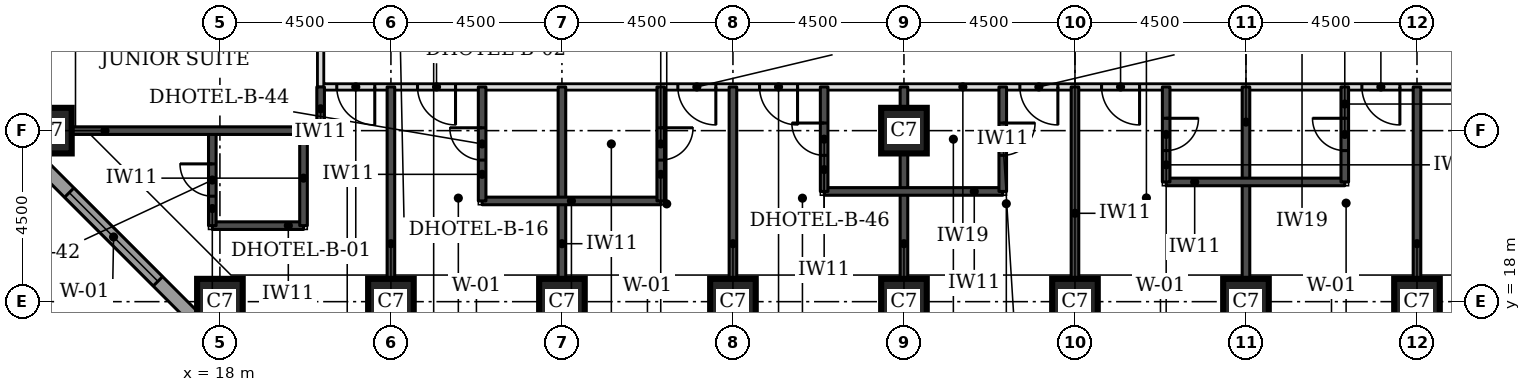
"""IFC4 building model, lengths in metres.
Left out: names, types, materials, properties, quantities, classifications, styles, units other than length and angle.
Written with IfcOpenShell. Run it as: python <this file> out.ifc"""

import sys

from ifc_helpers import new_model, si_unit, direction, frame, frame_2d, origin, origin_2d, place, context, subcontext, project, spatial, rectangle, extrude, element, fill, save


model = new_model("IFC4")
c1 = context("Model", 3, precision=1e-05, world=origin(), true_north=direction((0.0, 1.0)))
c2 = subcontext(c1, "Body", "Model", "MODEL_VIEW")
j1 = project(units=[si_unit("LENGTHUNIT", "METRE"), si_unit("PLANEANGLEUNIT", "RADIAN")], contexts=[c1])
p1 = place(None, origin())
s1 = spatial("IfcSite", under=j1, at=p1, CompositionType="ELEMENT")
p2 = place(p1, origin())
s2 = spatial("IfcBuilding", under=s1, at=p2, CompositionType="ELEMENT")
p3 = place(p2, frame((0.0, 0.0, 52.8)))
s3 = spatial("IfcBuildingStorey", under=s2, at=p3, CompositionType="ELEMENT", Elevation=52.8)
for number, where, z_axis, x_axis in (
    (1, (18.0, 18.0, 0.0), (0.0, 0.0, 1.0), (1.0, 0.0, 0.0)),
    (2, (22.5, 18.0, 0.0), (0.0, 0.0, 1.0), (1.0, 0.0, 0.0)),
    (3, (27.0, 18.0, 0.0), (0.0, 0.0, 1.0), (1.0, 0.0, 0.0)),
    (4, (31.5, 18.0, 0.0), (0.0, 0.0, 1.0), (1.0, 0.0, 0.0)),
    (5, (36.0, 18.0, 0.0), (0.0, 0.0, 1.0), (1.0, 0.0, 0.0)),
    (6, (40.5, 18.0, 0.0), (0.0, 0.0, 1.0), (1.0, 0.0, 0.0)),
    (7, (45.0, 18.0, 0.0), (0.0, 0.0, 1.0), (1.0, 0.0, 0.0)),
    (8, (49.5, 18.0, 0.0), (0.0, 0.0, 1.0), (1.0, 0.0, 0.0)),
    (9, (13.5, 22.5, 0.0), (0.0, 0.0, 1.0), (1.0, 0.0, 0.0)),
    (10, (36.0, 22.5, 0.0), (0.0, 0.0, 1.0), (1.0, 0.0, 0.0)),
):
    element("IfcColumn", number, at=place(p3, frame(where, z_axis=z_axis, x_axis=x_axis)), inside=s3, PredefinedType="COLUMN", context=c2, shape_type="SweptSolid", body=[
        extrude(rectangle(XDim=1.2, YDim=1.2, at=origin_2d()), origin(), (0.0, 0.0, 1.0), 3.3),
    ])
p4 = place(p3, frame((12.674, 22.23, 0.0), z_axis=(0.0, 0.0, 1.0), x_axis=(0.707106781187, -0.707106781187, 0.0)))
e11 = element("IfcWall", 11, at=p4, inside=s3, PredefinedType="STANDARD", context=c2, shape_type="SweptSolid", body=[
    extrude(rectangle(XDim=7.151, YDim=0.35, at=frame_2d((3.576, 0.0))), origin(), (0.0, 0.0, 1.0), 3.055),
])
p5 = place(p4, frame((1.926, 0.0, 0.8)))
e12 = element("IfcOpeningElement", 12, at=p5, cuts=e11, PredefinedType="OPENING", context=c2, shape_type="SweptSolid", body=[
    extrude(rectangle(XDim=3.3, YDim=1.5, at=frame_2d((1.65, 0.75))), frame((0.0, 0.185, 0.0), z_axis=(0.0, -1.0, 0.0), x_axis=(1.0, 0.0, 0.0)), (0.0, 0.0, 1.0), 0.37),
])
p6 = place(p3, frame((20.65, 23.65, 0.0), z_axis=(0.0, 0.0, 1.0), x_axis=(1.0, 0.0, 0.0)))
e13 = element("IfcWall", 13, at=p6, inside=s3, PredefinedType="PARTITIONING", context=c2, shape_type="SweptSolid", body=[
    extrude(rectangle(XDim=32.2, YDim=0.15, at=frame_2d((16.1, 0.0))), origin(), (0.0, 0.0, 1.0), 3.08),
])
p7 = place(p6, frame((2.55, 0.0, 0.0)))
e14 = element("IfcOpeningElement", 14, at=p7, cuts=e13, PredefinedType="OPENING", context=c2, shape_type="SweptSolid", body=[
    extrude(rectangle(XDim=1.0, YDim=2.1, at=frame_2d((0.5, 1.05))), frame((0.0, 0.085, 0.0), z_axis=(0.0, -1.0, 0.0), x_axis=(1.0, 0.0, 0.0)), (0.0, 0.0, 1.0), 0.17),
])
p8 = place(p6, frame((9.4, 0.0, 0.0)))
e15 = element("IfcOpeningElement", 15, at=p8, cuts=e13, PredefinedType="OPENING", context=c2, shape_type="SweptSolid", body=[
    extrude(rectangle(XDim=1.0, YDim=2.1, at=frame_2d((0.5, 1.05))), frame((0.0, 0.085, 0.0), z_axis=(0.0, -1.0, 0.0), x_axis=(1.0, 0.0, 0.0)), (0.0, 0.0, 1.0), 0.17),
])
p9 = place(p6, frame((11.55, 0.0, 0.0)))
e16 = element("IfcOpeningElement", 16, at=p9, cuts=e13, PredefinedType="OPENING", context=c2, shape_type="SweptSolid", body=[
    extrude(rectangle(XDim=1.0, YDim=2.1, at=frame_2d((0.5, 1.05))), frame((0.0, 0.085, 0.0), z_axis=(0.0, -1.0, 0.0), x_axis=(1.0, 0.0, 0.0)), (0.0, 0.0, 1.0), 0.17),
])
p10 = place(p6, frame((18.4, 0.0, 0.0)))
e17 = element("IfcOpeningElement", 17, at=p10, cuts=e13, PredefinedType="OPENING", context=c2, shape_type="SweptSolid", body=[
    extrude(rectangle(XDim=1.0, YDim=2.1, at=frame_2d((0.5, 1.05))), frame((0.0, 0.085, 0.0), z_axis=(0.0, -1.0, 0.0), x_axis=(1.0, 0.0, 0.0)), (0.0, 0.0, 1.0), 0.17),
])
p11 = place(p6, frame((20.55, 0.0, 0.0)))
e18 = element("IfcOpeningElement", 18, at=p11, cuts=e13, PredefinedType="OPENING", context=c2, shape_type="SweptSolid", body=[
    extrude(rectangle(XDim=1.0, YDim=2.1, at=frame_2d((0.5, 1.05))), frame((0.0, 0.085, 0.0), z_axis=(0.0, -1.0, 0.0), x_axis=(1.0, 0.0, 0.0)), (0.0, 0.0, 1.0), 0.17),
])
p12 = place(p6, frame((27.4, 0.0, 0.0)))
e19 = element("IfcOpeningElement", 19, at=p12, cuts=e13, PredefinedType="OPENING", context=c2, shape_type="SweptSolid", body=[
    extrude(rectangle(XDim=1.0, YDim=2.1, at=frame_2d((0.5, 1.05))), frame((0.0, 0.085, 0.0), z_axis=(0.0, -1.0, 0.0), x_axis=(1.0, 0.0, 0.0)), (0.0, 0.0, 1.0), 0.17),
])
p13 = place(p6, frame((0.425, 0.0, 0.0)))
e20 = element("IfcOpeningElement", 20, at=p13, cuts=e13, PredefinedType="OPENING", context=c2, shape_type="SweptSolid", body=[
    extrude(rectangle(XDim=1.0, YDim=2.1, at=frame_2d((0.5, 1.05))), frame((0.0, 0.085, 0.0), z_axis=(0.0, -1.0, 0.0), x_axis=(1.0, 0.0, 0.0)), (0.0, 0.0, 1.0), 0.17),
])
p14 = place(p6, frame((30.025, 0.0, 0.0)))
e21 = element("IfcOpeningElement", 21, at=p14, cuts=e13, PredefinedType="OPENING", context=c2, shape_type="SweptSolid", body=[
    extrude(rectangle(XDim=1.0, YDim=2.1, at=frame_2d((0.5, 1.05))), frame((0.0, 0.085, 0.0), z_axis=(0.0, -1.0, 0.0), x_axis=(1.0, 0.0, 0.0)), (0.0, 0.0, 1.0), 0.17),
])
p15 = place(p3, frame((20.65, 23.65, 0.0), z_axis=(0.0, 0.0, 1.0), x_axis=(0.0, 1.0, 0.0)))
e22 = element("IfcWall", 22, at=p15, inside=s3, PredefinedType="PARTITIONING", context=c2, shape_type="SweptSolid", body=[
    extrude(rectangle(XDim=25.85, YDim=0.15, at=frame_2d((12.925, 0.0))), origin(), (0.0, 0.0, 1.0), 3.08),
])
p16 = place(p15, frame((1.5, 0.0, 0.0)))
e23 = element("IfcOpeningElement", 23, at=p16, cuts=e22, PredefinedType="OPENING", context=c2, shape_type="SweptSolid", body=[
    extrude(rectangle(XDim=1.0, YDim=2.1, at=frame_2d((0.5, 1.05))), frame((0.0, 0.085, 0.0), z_axis=(0.0, -1.0, 0.0), x_axis=(1.0, 0.0, 0.0)), (0.0, 0.0, 1.0), 0.17),
])
p17 = place(p15, frame((13.45, 0.0, 0.0)))
e24 = element("IfcOpeningElement", 24, at=p17, cuts=e22, PredefinedType="OPENING", context=c2, shape_type="SweptSolid", body=[
    extrude(rectangle(XDim=1.0, YDim=2.1, at=frame_2d((0.5, 1.05))), frame((0.0, 0.085, 0.0), z_axis=(0.0, -1.0, 0.0), x_axis=(1.0, 0.0, 0.0)), (0.0, 0.0, 1.0), 0.17),
])
p18 = place(p15, frame((19.5, 0.0, 0.0)))
e25 = element("IfcOpeningElement", 25, at=p18, cuts=e22, PredefinedType="OPENING", context=c2, shape_type="SweptSolid", body=[
    extrude(rectangle(XDim=1.0, YDim=2.1, at=frame_2d((0.5, 1.05))), frame((0.0, 0.085, 0.0), z_axis=(0.0, -1.0, 0.0), x_axis=(1.0, 0.0, 0.0)), (0.0, 0.0, 1.0), 0.17),
])
for number, where, z_axis, x_axis in (
    (26, (22.5, 18.6, 0.0), (0.0, 0.0, 1.0), (0.0, 1.0, 0.0)),
    (27, (27.0, 18.6, 0.0), (0.0, 0.0, 1.0), (0.0, 1.0, 0.0)),
    (28, (31.5, 18.6, 0.0), (0.0, 0.0, 1.0), (0.0, 1.0, 0.0)),
    (29, (36.0, 18.6, 0.0), (0.0, 0.0, 1.0), (0.0, 1.0, 0.0)),
    (30, (40.5, 18.6, 0.0), (0.0, 0.0, 1.0), (0.0, 1.0, 0.0)),
    (31, (45.0, 18.6, 0.0), (0.0, 0.0, 1.0), (0.0, 1.0, 0.0)),
    (32, (49.5, 18.6, 0.0), (0.0, 0.0, 1.0), (0.0, 1.0, 0.0)),
):
    element("IfcWall", number, at=place(p3, frame(where, z_axis=z_axis, x_axis=x_axis)), inside=s3, PredefinedType="SOLIDWALL", context=c2, shape_type="SweptSolid", body=[
        extrude(rectangle(XDim=5.05, YDim=0.2, at=frame_2d((2.525, 0.0))), origin(), (0.0, 0.0, 1.0), 3.08),
    ])
p19 = place(p3, frame((17.8, 20.0, 0.0), z_axis=(0.0, 0.0, 1.0), x_axis=(1.0, 0.0, 0.0)))
e33 = element("IfcWall", 33, at=p19, inside=s3, PredefinedType="SOLIDWALL", context=c2, shape_type="SweptSolid", body=[
    extrude(rectangle(XDim=2.4, YDim=0.2, at=frame_2d((1.2, 0.0))), origin(), (0.0, 0.0, 1.0), 3.08),
])
p20 = place(p3, frame((17.8, 20.0, 0.0), z_axis=(0.0, 0.0, 1.0), x_axis=(0.0, 1.0, 0.0)))
e34 = element("IfcWall", 34, at=p20, inside=s3, PredefinedType="SOLIDWALL", context=c2, shape_type="SweptSolid", body=[
    extrude(rectangle(XDim=2.5, YDim=0.2, at=frame_2d((1.25, 0.0))), origin(), (0.0, 0.0, 1.0), 3.08),
])
p21 = place(p20, frame((0.775, 0.0, 0.0)))
e35 = element("IfcOpeningElement", 35, at=p21, cuts=e34, PredefinedType="OPENING", context=c2, shape_type="SweptSolid", body=[
    extrude(rectangle(XDim=0.85, YDim=2.1, at=frame_2d((0.425, 1.05))), frame((0.0, 0.11, 0.0), z_axis=(0.0, -1.0, 0.0), x_axis=(1.0, 0.0, 0.0)), (0.0, 0.0, 1.0), 0.22),
])
p22 = place(p3, frame((20.2, 20.0, 0.0), z_axis=(0.0, 0.0, 1.0), x_axis=(0.0, 1.0, 0.0)))
e36 = element("IfcWall", 36, at=p22, inside=s3, PredefinedType="SOLIDWALL", context=c2, shape_type="SweptSolid", body=[
    extrude(rectangle(XDim=2.5, YDim=0.2, at=frame_2d((1.25, 0.0))), origin(), (0.0, 0.0, 1.0), 3.08),
])
p23 = place(p3, frame((24.9, 20.65, 0.0), z_axis=(0.0, 0.0, 1.0), x_axis=(1.0, 0.0, 0.0)))
e37 = element("IfcWall", 37, at=p23, inside=s3, PredefinedType="SOLIDWALL", context=c2, shape_type="SweptSolid", body=[
    extrude(rectangle(XDim=4.7, YDim=0.2, at=frame_2d((2.35, 0.0))), origin(), (0.0, 0.0, 1.0), 3.08),
])
p24 = place(p3, frame((24.9, 20.65, 0.0), z_axis=(0.0, 0.0, 1.0), x_axis=(0.0, 1.0, 0.0)))
e38 = element("IfcWall", 38, at=p24, inside=s3, PredefinedType="SOLIDWALL", context=c2, shape_type="SweptSolid", body=[
    extrude(rectangle(XDim=3.0, YDim=0.2, at=frame_2d((1.5, 0.0))), origin(), (0.0, 0.0, 1.0), 3.08),
])
p25 = place(p24, frame((1.075, 0.0, 0.0)))
e39 = element("IfcOpeningElement", 39, at=p25, cuts=e38, PredefinedType="OPENING", context=c2, shape_type="SweptSolid", body=[
    extrude(rectangle(XDim=0.85, YDim=2.1, at=frame_2d((0.425, 1.05))), frame((0.0, 0.11, 0.0), z_axis=(0.0, -1.0, 0.0), x_axis=(1.0, 0.0, 0.0)), (0.0, 0.0, 1.0), 0.22),
])
p26 = place(p3, frame((29.6, 20.65, 0.0), z_axis=(0.0, 0.0, 1.0), x_axis=(0.0, 1.0, 0.0)))
e40 = element("IfcWall", 40, at=p26, inside=s3, PredefinedType="SOLIDWALL", context=c2, shape_type="SweptSolid", body=[
    extrude(rectangle(XDim=3.0, YDim=0.2, at=frame_2d((1.5, 0.0))), origin(), (0.0, 0.0, 1.0), 3.08),
])
p27 = place(p26, frame((1.075, 0.0, 0.0)))
e41 = element("IfcOpeningElement", 41, at=p27, cuts=e40, PredefinedType="OPENING", context=c2, shape_type="SweptSolid", body=[
    extrude(rectangle(XDim=0.85, YDim=2.1, at=frame_2d((0.425, 1.05))), frame((0.0, 0.11, 0.0), z_axis=(0.0, -1.0, 0.0), x_axis=(1.0, 0.0, 0.0)), (0.0, 0.0, 1.0), 0.22),
])
p28 = place(p3, frame((33.9, 20.9, 0.0), z_axis=(0.0, 0.0, 1.0), x_axis=(1.0, 0.0, 0.0)))
e42 = element("IfcWall", 42, at=p28, inside=s3, PredefinedType="SOLIDWALL", context=c2, shape_type="SweptSolid", body=[
    extrude(rectangle(XDim=4.7, YDim=0.2, at=frame_2d((2.35, 0.0))), origin(), (0.0, 0.0, 1.0), 3.08),
])
p29 = place(p3, frame((33.9, 20.9, 0.0), z_axis=(0.0, 0.0, 1.0), x_axis=(0.0, 1.0, 0.0)))
e43 = element("IfcWall", 43, at=p29, inside=s3, PredefinedType="SOLIDWALL", context=c2, shape_type="SweptSolid", body=[
    extrude(rectangle(XDim=2.75, YDim=0.2, at=frame_2d((1.375, 0.0))), origin(), (0.0, 0.0, 1.0), 3.08),
])
p30 = place(p29, frame((0.95, 0.0, 0.0)))
e44 = element("IfcOpeningElement", 44, at=p30, cuts=e43, PredefinedType="OPENING", context=c2, shape_type="SweptSolid", body=[
    extrude(rectangle(XDim=0.85, YDim=2.1, at=frame_2d((0.425, 1.05))), frame((0.0, 0.11, 0.0), z_axis=(0.0, -1.0, 0.0), x_axis=(1.0, 0.0, 0.0)), (0.0, 0.0, 1.0), 0.22),
])
p31 = place(p3, frame((38.6, 20.9, 0.0), z_axis=(0.0, 0.0, 1.0), x_axis=(0.0, 1.0, 0.0)))
e45 = element("IfcWall", 45, at=p31, inside=s3, PredefinedType="SOLIDWALL", context=c2, shape_type="SweptSolid", body=[
    extrude(rectangle(XDim=2.75, YDim=0.2, at=frame_2d((1.375, 0.0))), origin(), (0.0, 0.0, 1.0), 3.08),
])
p32 = place(p31, frame((0.95, 0.0, 0.0)))
e46 = element("IfcOpeningElement", 46, at=p32, cuts=e45, PredefinedType="OPENING", context=c2, shape_type="SweptSolid", body=[
    extrude(rectangle(XDim=0.85, YDim=2.1, at=frame_2d((0.425, 1.05))), frame((0.0, 0.11, 0.0), z_axis=(0.0, -1.0, 0.0), x_axis=(1.0, 0.0, 0.0)), (0.0, 0.0, 1.0), 0.22),
])
p33 = place(p3, frame((42.9, 21.15, 0.0), z_axis=(0.0, 0.0, 1.0), x_axis=(1.0, 0.0, 0.0)))
e47 = element("IfcWall", 47, at=p33, inside=s3, PredefinedType="SOLIDWALL", context=c2, shape_type="SweptSolid", body=[
    extrude(rectangle(XDim=4.7, YDim=0.2, at=frame_2d((2.35, 0.0))), origin(), (0.0, 0.0, 1.0), 3.08),
])
p34 = place(p3, frame((42.9, 21.15, 0.0), z_axis=(0.0, 0.0, 1.0), x_axis=(0.0, 1.0, 0.0)))
e48 = element("IfcWall", 48, at=p34, inside=s3, PredefinedType="SOLIDWALL", context=c2, shape_type="SweptSolid", body=[
    extrude(rectangle(XDim=2.5, YDim=0.2, at=frame_2d((1.25, 0.0))), origin(), (0.0, 0.0, 1.0), 3.08),
])
p35 = place(p34, frame((0.825, 0.0, 0.0)))
e49 = element("IfcOpeningElement", 49, at=p35, cuts=e48, PredefinedType="OPENING", context=c2, shape_type="SweptSolid", body=[
    extrude(rectangle(XDim=0.85, YDim=2.1, at=frame_2d((0.425, 1.05))), frame((0.0, 0.11, 0.0), z_axis=(0.0, -1.0, 0.0), x_axis=(1.0, 0.0, 0.0)), (0.0, 0.0, 1.0), 0.22),
])
p36 = place(p3, frame((47.6, 21.15, 0.0), z_axis=(0.0, 0.0, 1.0), x_axis=(0.0, 1.0, 0.0)))
e50 = element("IfcWall", 50, at=p36, inside=s3, PredefinedType="SOLIDWALL", context=c2, shape_type="SweptSolid", body=[
    extrude(rectangle(XDim=2.5, YDim=0.2, at=frame_2d((1.25, 0.0))), origin(), (0.0, 0.0, 1.0), 3.08),
])
p37 = place(p36, frame((0.825, 0.0, 0.0)))
e51 = element("IfcOpeningElement", 51, at=p37, cuts=e50, PredefinedType="OPENING", context=c2, shape_type="SweptSolid", body=[
    extrude(rectangle(XDim=0.85, YDim=2.1, at=frame_2d((0.425, 1.05))), frame((0.0, 0.11, 0.0), z_axis=(0.0, -1.0, 0.0), x_axis=(1.0, 0.0, 0.0)), (0.0, 0.0, 1.0), 0.22),
])
p38 = place(p3, frame((14.1, 22.5, 0.0), z_axis=(0.0, 0.0, 1.0), x_axis=(1.0, 0.0, 0.0)))
e52 = element("IfcWall", 52, at=p38, inside=s3, PredefinedType="SOLIDWALL", context=c2, shape_type="SweptSolid", body=[
    extrude(rectangle(XDim=6.55, YDim=0.2, at=frame_2d((3.275, 0.0))), origin(), (0.0, 0.0, 1.0), 3.08),
])
p39 = place(p3, frame((20.65, 22.5, 0.0), z_axis=(0.0, 0.0, 1.0), x_axis=(0.0, 1.0, 0.0)))
e53 = element("IfcWall", 53, at=p39, inside=s3, PredefinedType="SOLIDWALL", context=c2, shape_type="SweptSolid", body=[
    extrude(rectangle(XDim=1.15, YDim=0.2, at=frame_2d((0.575, 0.0))), origin(), (0.0, 0.0, 1.0), 3.08),
])
p40 = place(p5, origin())
e54 = element("IfcWindow", 54, at=p40, inside=s3, PartitioningType="SINGLE_PANEL", PredefinedType="WINDOW", context=c2, shape_type="SweptSolid", body=[
    extrude(rectangle(XDim=3.3, YDim=1.5, at=frame_2d((1.65, 0.75))), frame((0.0, 0.085, 0.0), z_axis=(0.0, -1.0, 0.0), x_axis=(1.0, 0.0, 0.0)), (0.0, 0.0, 1.0), 0.06),
])
fill(e12, e54)
p41 = place(p7, frame((1.0, 0.0, 0.0), z_axis=(0.0, 0.0, 1.0), x_axis=(-1.0, 0.0, 0.0)))
e55 = element("IfcDoor", 55, at=p41, inside=s3, OperationType="SINGLE_SWING_LEFT", PredefinedType="DOOR", context=c2, shape_type="SweptSolid", body=[
    extrude(rectangle(XDim=1.0, YDim=2.1, at=frame_2d((0.5, 1.05))), frame((0.0, 0.025, 0.0), z_axis=(0.0, -1.0, 0.0), x_axis=(1.0, 0.0, 0.0)), (0.0, 0.0, 1.0), 0.05),
])
fill(e14, e55)
p42 = place(p25, origin())
e56 = element("IfcDoor", 56, at=p42, inside=s3, OperationType="SINGLE_SWING_RIGHT", PredefinedType="DOOR", context=c2, shape_type="SweptSolid", body=[
    extrude(rectangle(XDim=0.85, YDim=2.1, at=frame_2d((0.425, 1.05))), frame((0.0, 0.025, 0.0), z_axis=(0.0, -1.0, 0.0), x_axis=(1.0, 0.0, 0.0)), (0.0, 0.0, 1.0), 0.05),
])
fill(e39, e56)
p43 = place(p8, frame((1.0, 0.0, 0.0), z_axis=(0.0, 0.0, 1.0), x_axis=(-1.0, 0.0, 0.0)))
e57 = element("IfcDoor", 57, at=p43, inside=s3, OperationType="SINGLE_SWING_LEFT", PredefinedType="DOOR", context=c2, shape_type="SweptSolid", body=[
    extrude(rectangle(XDim=1.0, YDim=2.1, at=frame_2d((0.5, 1.05))), frame((0.0, 0.025, 0.0), z_axis=(0.0, -1.0, 0.0), x_axis=(1.0, 0.0, 0.0)), (0.0, 0.0, 1.0), 0.05),
])
fill(e15, e57)
p44 = place(p27, frame((0.85, 0.0, 0.0), z_axis=(0.0, 0.0, 1.0), x_axis=(-1.0, 0.0, 0.0)))
e58 = element("IfcDoor", 58, at=p44, inside=s3, OperationType="SINGLE_SWING_LEFT", PredefinedType="DOOR", context=c2, shape_type="SweptSolid", body=[
    extrude(rectangle(XDim=0.85, YDim=2.1, at=frame_2d((0.425, 1.05))), frame((0.0, 0.025, 0.0), z_axis=(0.0, -1.0, 0.0), x_axis=(1.0, 0.0, 0.0)), (0.0, 0.0, 1.0), 0.05),
])
fill(e41, e58)
p45 = place(p9, frame((1.0, 0.0, 0.0), z_axis=(0.0, 0.0, 1.0), x_axis=(-1.0, 0.0, 0.0)))
e59 = element("IfcDoor", 59, at=p45, inside=s3, OperationType="SINGLE_SWING_LEFT", PredefinedType="DOOR", context=c2, shape_type="SweptSolid", body=[
    extrude(rectangle(XDim=1.0, YDim=2.1, at=frame_2d((0.5, 1.05))), frame((0.0, 0.025, 0.0), z_axis=(0.0, -1.0, 0.0), x_axis=(1.0, 0.0, 0.0)), (0.0, 0.0, 1.0), 0.05),
])
fill(e16, e59)
p46 = place(p30, origin())
e60 = element("IfcDoor", 60, at=p46, inside=s3, OperationType="SINGLE_SWING_RIGHT", PredefinedType="DOOR", context=c2, shape_type="SweptSolid", body=[
    extrude(rectangle(XDim=0.85, YDim=2.1, at=frame_2d((0.425, 1.05))), frame((0.0, 0.025, 0.0), z_axis=(0.0, -1.0, 0.0), x_axis=(1.0, 0.0, 0.0)), (0.0, 0.0, 1.0), 0.05),
])
fill(e44, e60)
p47 = place(p10, frame((1.0, 0.0, 0.0), z_axis=(0.0, 0.0, 1.0), x_axis=(-1.0, 0.0, 0.0)))
e61 = element("IfcDoor", 61, at=p47, inside=s3, OperationType="SINGLE_SWING_LEFT", PredefinedType="DOOR", context=c2, shape_type="SweptSolid", body=[
    extrude(rectangle(XDim=1.0, YDim=2.1, at=frame_2d((0.5, 1.05))), frame((0.0, 0.025, 0.0), z_axis=(0.0, -1.0, 0.0), x_axis=(1.0, 0.0, 0.0)), (0.0, 0.0, 1.0), 0.05),
])
fill(e17, e61)
p48 = place(p32, frame((0.85, 0.0, 0.0), z_axis=(0.0, 0.0, 1.0), x_axis=(-1.0, 0.0, 0.0)))
e62 = element("IfcDoor", 62, at=p48, inside=s3, OperationType="SINGLE_SWING_LEFT", PredefinedType="DOOR", context=c2, shape_type="SweptSolid", body=[
    extrude(rectangle(XDim=0.85, YDim=2.1, at=frame_2d((0.425, 1.05))), frame((0.0, 0.025, 0.0), z_axis=(0.0, -1.0, 0.0), x_axis=(1.0, 0.0, 0.0)), (0.0, 0.0, 1.0), 0.05),
])
fill(e46, e62)
p49 = place(p11, frame((1.0, 0.0, 0.0), z_axis=(0.0, 0.0, 1.0), x_axis=(-1.0, 0.0, 0.0)))
e63 = element("IfcDoor", 63, at=p49, inside=s3, OperationType="SINGLE_SWING_LEFT", PredefinedType="DOOR", context=c2, shape_type="SweptSolid", body=[
    extrude(rectangle(XDim=1.0, YDim=2.1, at=frame_2d((0.5, 1.05))), frame((0.0, 0.025, 0.0), z_axis=(0.0, -1.0, 0.0), x_axis=(1.0, 0.0, 0.0)), (0.0, 0.0, 1.0), 0.05),
])
fill(e18, e63)
p50 = place(p35, frame((0.85, 0.0, 0.0), z_axis=(0.0, 0.0, 1.0), x_axis=(-1.0, 0.0, 0.0)))
e64 = element("IfcDoor", 64, at=p50, inside=s3, OperationType="SINGLE_SWING_LEFT", PredefinedType="DOOR", context=c2, shape_type="SweptSolid", body=[
    extrude(rectangle(XDim=0.85, YDim=2.1, at=frame_2d((0.425, 1.05))), frame((0.0, 0.025, 0.0), z_axis=(0.0, -1.0, 0.0), x_axis=(1.0, 0.0, 0.0)), (0.0, 0.0, 1.0), 0.05),
])
fill(e49, e64)
p51 = place(p12, frame((1.0, 0.0, 0.0), z_axis=(0.0, 0.0, 1.0), x_axis=(-1.0, 0.0, 0.0)))
e65 = element("IfcDoor", 65, at=p51, inside=s3, OperationType="SINGLE_SWING_LEFT", PredefinedType="DOOR", context=c2, shape_type="SweptSolid", body=[
    extrude(rectangle(XDim=1.0, YDim=2.1, at=frame_2d((0.5, 1.05))), frame((0.0, 0.025, 0.0), z_axis=(0.0, -1.0, 0.0), x_axis=(1.0, 0.0, 0.0)), (0.0, 0.0, 1.0), 0.05),
])
fill(e19, e65)
p52 = place(p37, origin())
e66 = element("IfcDoor", 66, at=p52, inside=s3, OperationType="SINGLE_SWING_RIGHT", PredefinedType="DOOR", context=c2, shape_type="SweptSolid", body=[
    extrude(rectangle(XDim=0.85, YDim=2.1, at=frame_2d((0.425, 1.05))), frame((0.0, 0.025, 0.0), z_axis=(0.0, -1.0, 0.0), x_axis=(1.0, 0.0, 0.0)), (0.0, 0.0, 1.0), 0.05),
])
fill(e51, e66)
p53 = place(p13, frame((1.0, 0.0, 0.0), z_axis=(0.0, 0.0, 1.0), x_axis=(-1.0, 0.0, 0.0)))
e67 = element("IfcDoor", 67, at=p53, inside=s3, OperationType="SINGLE_SWING_LEFT", PredefinedType="DOOR", context=c2, shape_type="SweptSolid", body=[
    extrude(rectangle(XDim=1.0, YDim=2.1, at=frame_2d((0.5, 1.05))), frame((0.0, 0.025, 0.0), z_axis=(0.0, -1.0, 0.0), x_axis=(1.0, 0.0, 0.0)), (0.0, 0.0, 1.0), 0.05),
])
fill(e20, e67)
p54 = place(p21, origin())
e68 = element("IfcDoor", 68, at=p54, inside=s3, OperationType="SINGLE_SWING_RIGHT", PredefinedType="DOOR", context=c2, shape_type="SweptSolid", body=[
    extrude(rectangle(XDim=0.85, YDim=2.1, at=frame_2d((0.425, 1.05))), frame((0.0, 0.025, 0.0), z_axis=(0.0, -1.0, 0.0), x_axis=(1.0, 0.0, 0.0)), (0.0, 0.0, 1.0), 0.05),
])
fill(e35, e68)
save(model, sys.argv[1])
